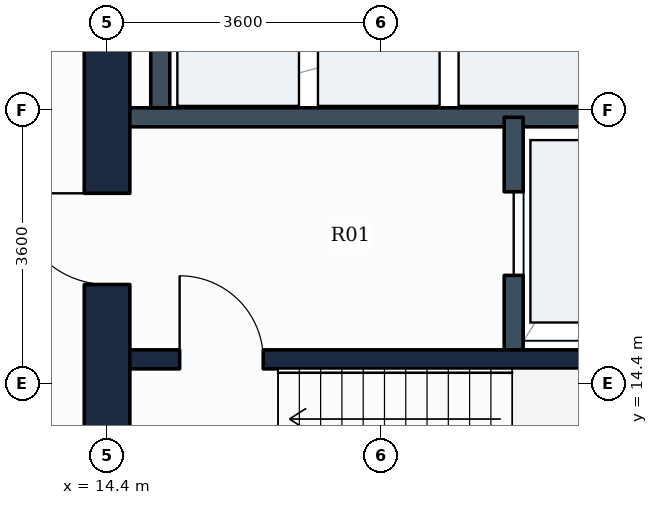
"""IFC4 building model, lengths in metres.
Left out: names, types, materials, properties, quantities, classifications, styles, units other than length and angle.
Written with IfcOpenShell. Run it as: python <this file> out.ifc"""

import sys

from ifc_helpers import new_model, si_unit, direction, frame, frame_2d, origin, place, context, subcontext, project, spatial, rectangle, extrude, element, fill, save


model = new_model("IFC4")
c1 = context("Model", 3, precision=1e-05, world=origin(), true_north=direction((0.0, 1.0)))
c2 = subcontext(c1, "Body", "Model", "MODEL_VIEW")
j1 = project(units=[si_unit("LENGTHUNIT", "METRE"), si_unit("PLANEANGLEUNIT", "RADIAN")], contexts=[c1])
p1 = place(None, origin())
s1 = spatial("IfcSite", under=j1, at=p1, CompositionType="ELEMENT")
p2 = place(p1, origin())
s2 = spatial("IfcBuilding", under=s1, at=p2, CompositionType="ELEMENT")
p3 = place(p2, frame((0.0, 0.0, 111.3)))
s3 = spatial("IfcBuildingStorey", under=s2, at=p3, CompositionType="ELEMENT", Elevation=111.3)
p4 = place(p3, frame((14.4, 10.8, 0.0), z_axis=(0.0, 0.0, 1.0), x_axis=(0.0, 1.0, 0.0)))
e1 = element("IfcWall", 1, at=p4, inside=s3, PredefinedType="SHEAR", context=c2, shape_type="SweptSolid", body=[
    extrude(rectangle(XDim=14.4, YDim=0.6, at=frame_2d((7.2, 0.0))), origin(), (0.0, 0.0, 1.0), 3.58),
])
p5 = place(p4, frame((11.05, 0.0, 0.0)))
e2 = element("IfcOpeningElement", 2, at=p5, cuts=e1, PredefinedType="OPENING", context=c2, shape_type="SweptSolid", body=[
    extrude(rectangle(XDim=1.1, YDim=2.1, at=frame_2d((0.55, 1.05))), frame((0.0, 0.31, 0.0), z_axis=(0.0, -1.0, 0.0), x_axis=(1.0, 0.0, 0.0)), (0.0, 0.0, 1.0), 0.62),
])
p6 = place(p4, frame((4.9, 0.0, 0.0)))
e3 = element("IfcOpeningElement", 3, at=p6, cuts=e1, PredefinedType="OPENING", context=c2, shape_type="SweptSolid", body=[
    extrude(rectangle(XDim=1.2, YDim=2.1, at=frame_2d((0.6, 1.05))), frame((0.0, 0.31, 0.0), z_axis=(0.0, -1.0, 0.0), x_axis=(1.0, 0.0, 0.0)), (0.0, 0.0, 1.0), 0.62),
])
p7 = place(p3, frame((14.7, 14.715, 0.0), z_axis=(0.0, 0.0, 1.0), x_axis=(1.0, 0.0, 0.0)))
e4 = element("IfcWall", 4, at=p7, inside=s3, PredefinedType="SHEAR", context=c2, shape_type="SweptSolid", body=[
    extrude(rectangle(XDim=8.65, YDim=0.25, at=frame_2d((4.325, 0.0))), origin(), (0.0, 0.0, 1.0), 3.58),
])
p8 = place(p7, frame((0.655, 0.0, 0.0)))
e5 = element("IfcOpeningElement", 5, at=p8, cuts=e4, PredefinedType="OPENING", context=c2, shape_type="SweptSolid", body=[
    extrude(rectangle(XDim=1.1, YDim=2.1, at=frame_2d((0.55, 1.05))), frame((0.0, 0.135, 0.0), z_axis=(0.0, -1.0, 0.0), x_axis=(1.0, 0.0, 0.0)), (0.0, 0.0, 1.0), 0.27),
])
p9 = place(p3, frame((14.65, 17.9, 0.0), z_axis=(0.0, 0.0, 1.0), x_axis=(1.0, 0.0, 0.0)))
e6 = element("IfcWall", 6, at=p9, inside=s3, PredefinedType="PARTITIONING", context=c2, shape_type="SweptSolid", body=[
    extrude(rectangle(XDim=7.15, YDim=0.25, at=frame_2d((3.575, 0.0))), origin(), (0.0, 0.0, 1.0), 3.565),
])
p10 = place(p3, frame((19.75, 14.84, 0.0), z_axis=(0.0, 0.0, 1.0), x_axis=(0.0, 1.0, 0.0)))
e7 = element("IfcWall", 7, at=p10, inside=s3, PredefinedType="PARTITIONING", context=c2, shape_type="SweptSolid", body=[
    extrude(rectangle(XDim=3.06, YDim=0.25, at=frame_2d((1.53, 0.0))), origin(), (0.0, 0.0, 1.0), 3.565),
])
p11 = place(p10, frame((0.98, 0.0, 0.0)))
e8 = element("IfcOpeningElement", 8, at=p11, cuts=e7, PredefinedType="OPENING", context=c2, shape_type="SweptSolid", body=[
    extrude(rectangle(XDim=1.1, YDim=2.1, at=frame_2d((0.55, 1.05))), frame((0.0, 0.135, 0.0), z_axis=(0.0, -1.0, 0.0), x_axis=(1.0, 0.0, 0.0)), (0.0, 0.0, 1.0), 0.27),
])
p12 = place(p3, frame((15.1, 18.025, 0.0), z_axis=(0.0, 0.0, 1.0), x_axis=(0.0, 1.0, 0.0)))
e9 = element("IfcWall", 9, at=p12, inside=s3, PredefinedType="PARTITIONING", context=c2, shape_type="SweptSolid", body=[
    extrude(rectangle(XDim=1.975, YDim=0.25, at=frame_2d((0.988, 0.0))), origin(), (0.0, 0.0, 1.0), 3.565),
])
p13 = place(p8, origin())
e10 = element("IfcDoor", 10, at=p13, inside=s3, OperationType="SINGLE_SWING_LEFT", PredefinedType="DOOR", context=c2, shape_type="SweptSolid", body=[
    extrude(rectangle(XDim=1.1, YDim=2.1, at=frame_2d((0.55, 1.05))), frame((0.0, 0.025, 0.0), z_axis=(0.0, -1.0, 0.0), x_axis=(1.0, 0.0, 0.0)), (0.0, 0.0, 1.0), 0.05),
])
fill(e5, e10)
p14 = place(p11, origin())
e11 = element("IfcDoor", 11, at=p14, inside=s3, OperationType="SLIDING_TO_LEFT", PredefinedType="DOOR", context=c2, shape_type="SweptSolid", body=[
    extrude(rectangle(XDim=1.1, YDim=2.1, at=frame_2d((0.55, 1.05))), frame((0.0, 0.025, 0.0), z_axis=(0.0, -1.0, 0.0), x_axis=(1.0, 0.0, 0.0)), (0.0, 0.0, 1.0), 0.05),
])
fill(e8, e11)
p15 = place(p6, origin())
e12 = element("IfcDoor", 12, at=p15, inside=s3, OperationType="SINGLE_SWING_RIGHT", PredefinedType="DOOR", context=c2, shape_type="SweptSolid", body=[
    extrude(rectangle(XDim=1.2, YDim=2.1, at=frame_2d((0.6, 1.05))), frame((0.0, 0.025, 0.0), z_axis=(0.0, -1.0, 0.0), x_axis=(1.0, 0.0, 0.0)), (0.0, 0.0, 1.0), 0.05),
])
fill(e3, e12)
save(model, sys.argv[1])
